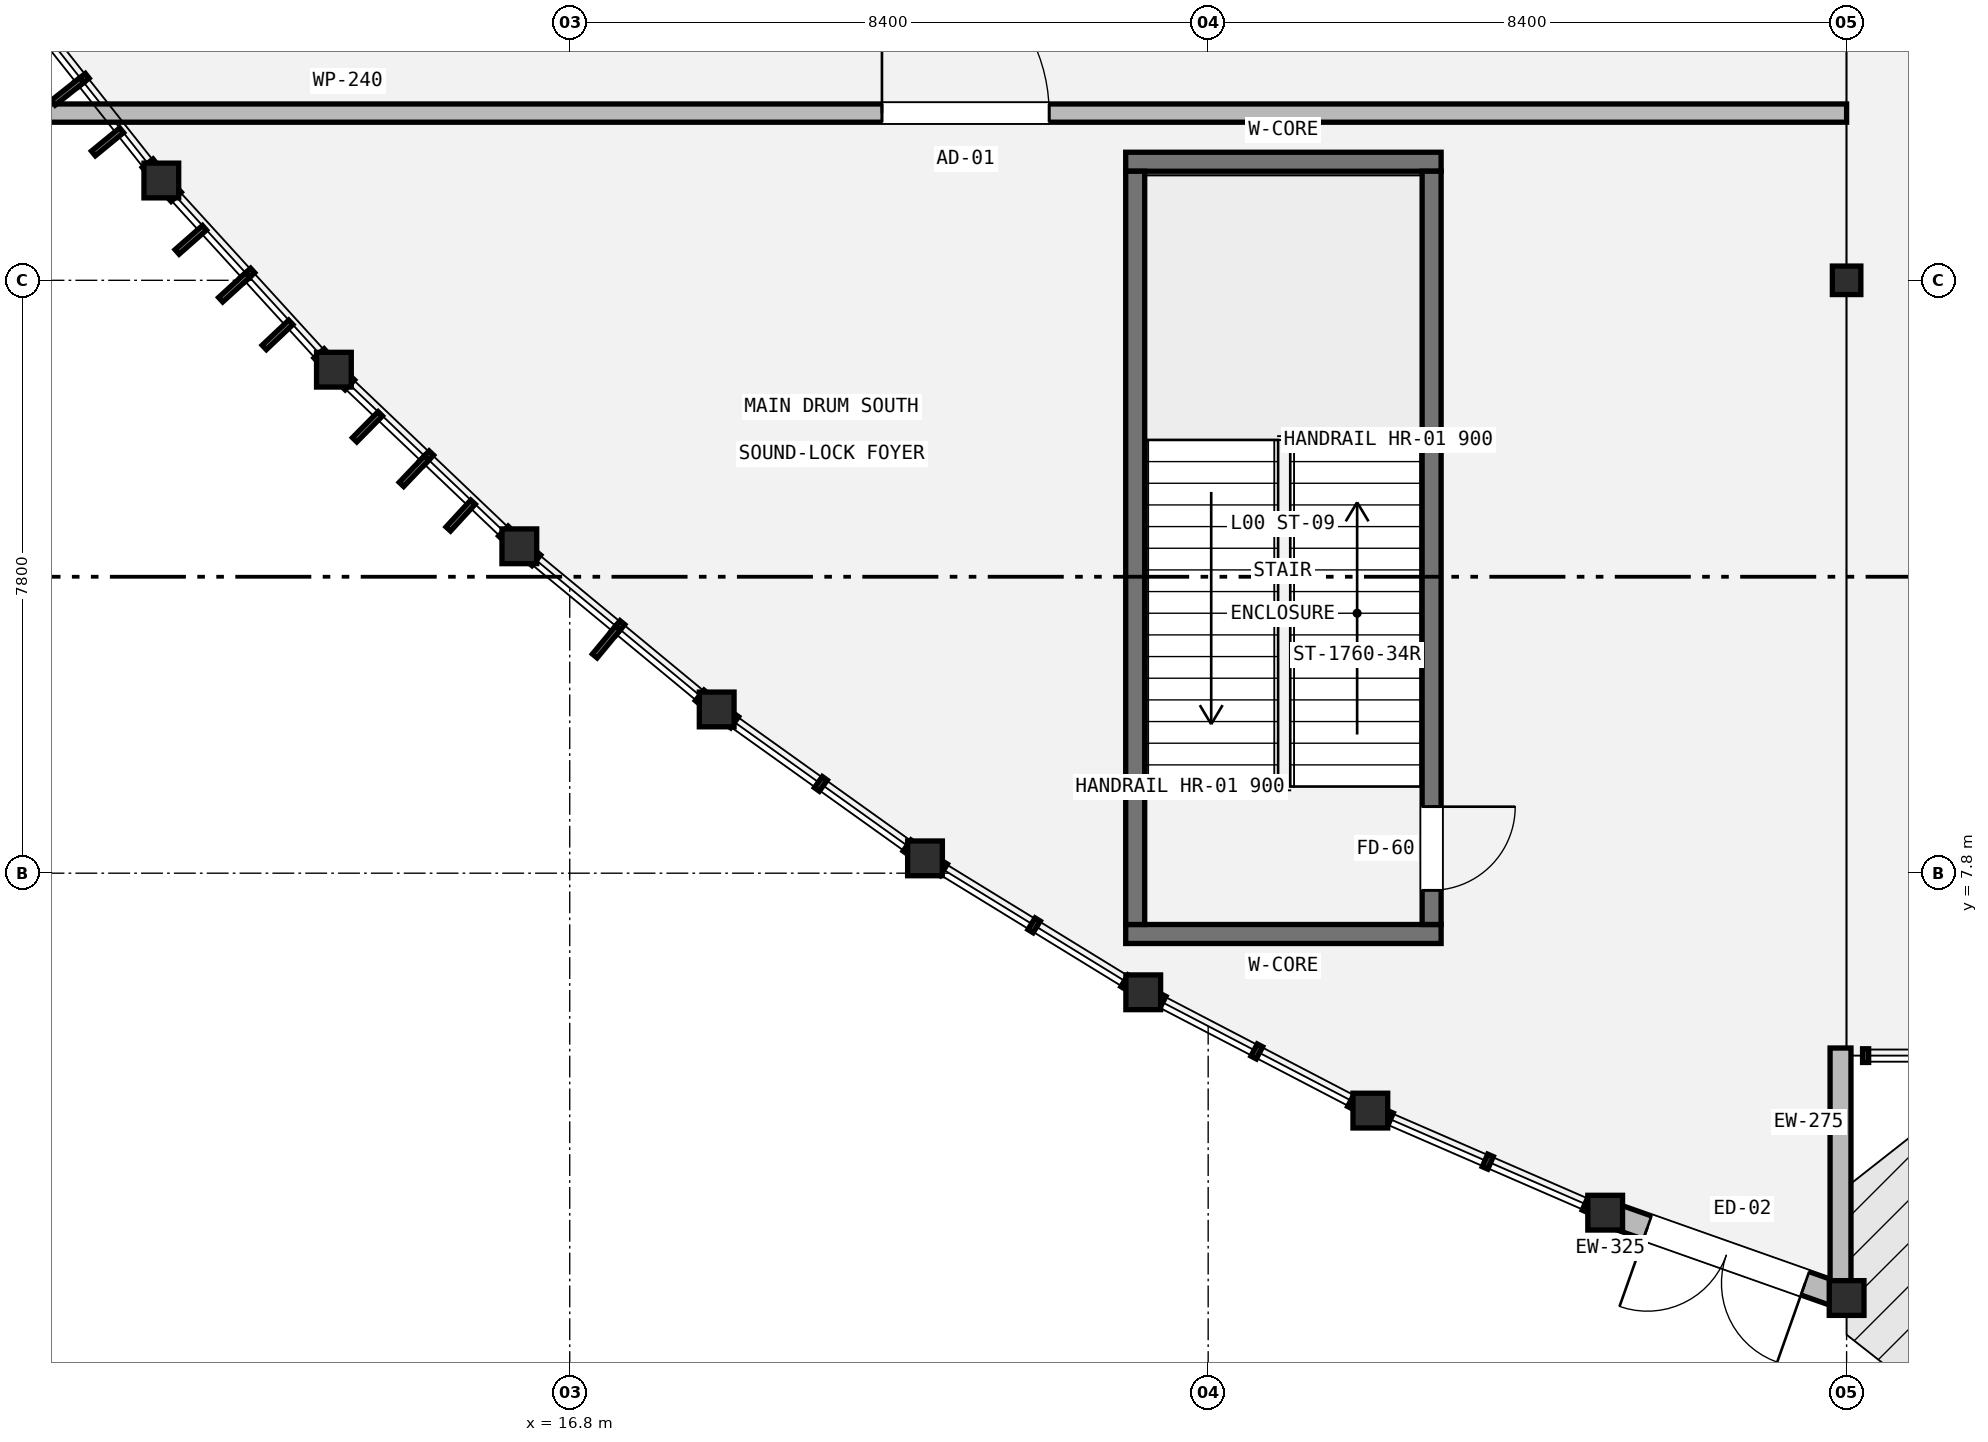
"""IFC4 building model, lengths in metres.
Left out: names, types, materials, properties, quantities, classifications, styles, units other than length and angle.
Written with IfcOpenShell. Run it as: python <this file> out.ifc"""

import sys

from ifc_helpers import new_model, si_unit, direction, frame, frame_2d, origin, origin_2d, place, context, subcontext, project, spatial, rectangle, hollow_circle, i_section, extrude, element, fill, save


model = new_model("IFC4")
c1 = context("Model", 3, precision=1e-05, world=origin(), true_north=direction((0.0, 1.0)))
c2 = subcontext(c1, "Body", "Model", "MODEL_VIEW")
j1 = project(units=[si_unit("LENGTHUNIT", "METRE"), si_unit("PLANEANGLEUNIT", "RADIAN")], contexts=[c1])
p1 = place(None, origin())
s1 = spatial("IfcSite", under=j1, at=p1, CompositionType="ELEMENT")
p2 = place(p1, origin())
s2 = spatial("IfcBuilding", under=s1, at=p2, CompositionType="ELEMENT")
p3 = place(p2, origin())
s3 = spatial("IfcBuildingStorey", under=s2, at=p3, CompositionType="ELEMENT", Elevation=0.0)
p4 = place(p3, frame((33.6, 15.6, 0.0), z_axis=(0.0, 0.0, 1.0), x_axis=(1.0, 0.0, 0.0)))
e1 = element("IfcColumn", 1, at=p4, inside=s3, PredefinedType="COLUMN", context=c2, shape_type="SweptSolid", body=[
    extrude(i_section(OverallWidth=0.375, OverallDepth=0.375, WebThickness=0.017, FlangeThickness=0.027, FilletRadius=0.015, at=origin_2d()), origin(), (0.0, 0.0, 1.0), 5.4),
])
for number, where, z_axis, x_axis in (
    (2, (11.427, 16.913, 0.0), (0.0, 0.0, 1.0), (1.0, 0.0, 0.0)),
    (3, (13.698, 14.424, 0.0), (0.0, 0.0, 1.0), (1.0, 0.0, 0.0)),
    (4, (16.137, 12.101, 0.0), (0.0, 0.0, 1.0), (1.0, 0.0, 0.0)),
    (5, (18.734, 9.954, 0.0), (0.0, 0.0, 1.0), (1.0, 0.0, 0.0)),
    (6, (21.474, 7.995, 0.0), (0.0, 0.0, 1.0), (1.0, 0.0, 0.0)),
    (7, (24.346, 6.233, 0.0), (0.0, 0.0, 1.0), (1.0, 0.0, 0.0)),
    (8, (27.334, 4.677, 0.0), (0.0, 0.0, 1.0), (1.0, 0.0, 0.0)),
    (9, (30.424, 3.334, 0.0), (0.0, 0.0, 1.0), (1.0, 0.0, 0.0)),
    (10, (33.6, 2.211, 0.0), (0.0, 0.0, 1.0), (1.0, 0.0, 0.0)),
):
    element("IfcColumn", number, at=place(p3, frame(where, z_axis=z_axis, x_axis=x_axis)), inside=s3, PredefinedType="COLUMN", context=c2, shape_type="SweptSolid", body=[
        extrude(hollow_circle(Radius=0.229, WallThickness=0.02, at=origin_2d()), origin(), (0.0, 0.0, 1.0), 5.4),
    ])
p5 = place(p3, frame((33.6, 2.211, 0.0), z_axis=(0.0, 0.0, 1.0), x_axis=(-0.942833706296, 0.333263562774, 0.0)))
e11 = element("IfcWall", 11, at=p5, inside=s3, PredefinedType="STANDARD", context=c2, shape_type="SweptSolid", body=[
    extrude(rectangle(XDim=3.369, YDim=0.325, at=frame_2d((1.685, 0.0))), origin(), (0.0, 0.0, 1.0), 4.692),
])
p6 = place(p5, frame((0.58, 0.0, 0.0)))
e12 = element("IfcOpeningElement", 12, at=p6, cuts=e11, PredefinedType="OPENING", context=c2, shape_type="SweptSolid", body=[
    extrude(rectangle(XDim=2.2, YDim=2.5, at=frame_2d((1.1, 1.25))), frame((0.0, 0.172, 0.0), z_axis=(0.0, -1.0, 0.0), x_axis=(1.0, 0.0, 0.0)), (0.0, 0.0, 1.0), 0.345),
])
p7 = place(p3, frame((33.52, 2.05, 0.0), z_axis=(0.0, 0.0, 1.0), x_axis=(0.0, 1.0, 0.0)))
e13 = element("IfcWall", 13, at=p7, inside=s3, PredefinedType="STANDARD", context=c2, shape_type="SweptSolid", body=[
    extrude(rectangle(XDim=3.45, YDim=0.275, at=frame_2d((1.725, 0.0))), origin(), (0.0, 0.0, 1.0), 4.772),
])
for number, where, z_axis, x_axis in (
    (14, (28.265, 7.0, 0.0), (0.0, 0.0, 1.0), (-1.0, 0.0, 0.0)),
    (15, (24.115, 17.16, 0.0), (0.0, 0.0, 1.0), (1.0, 0.0, 0.0)),
):
    element("IfcWall", number, at=place(p3, frame(where, z_axis=z_axis, x_axis=x_axis)), inside=s3, PredefinedType="SHEAR", context=c2, shape_type="SweptSolid", body=[
        extrude(rectangle(XDim=4.15, YDim=0.25, at=frame_2d((2.075, 0.0))), origin(), (0.0, 0.0, 1.0), 5.18),
    ])
p8 = place(p3, frame((24.24, 7.125, 0.0), z_axis=(0.0, 0.0, 1.0), x_axis=(0.0, 1.0, 0.0)))
e16 = element("IfcWall", 16, at=p8, inside=s3, PredefinedType="SHEAR", context=c2, shape_type="SweptSolid", body=[
    extrude(rectangle(XDim=9.91, YDim=0.25, at=frame_2d((4.955, 0.0))), origin(), (0.0, 0.0, 1.0), 5.18),
])
p9 = place(p3, frame((28.14, 17.035, 0.0), z_axis=(0.0, 0.0, 1.0), x_axis=(0.0, -1.0, 0.0)))
e17 = element("IfcWall", 17, at=p9, inside=s3, PredefinedType="SHEAR", context=c2, shape_type="SweptSolid", body=[
    extrude(rectangle(XDim=9.91, YDim=0.25, at=frame_2d((4.955, 0.0))), origin(), (0.0, 0.0, 1.0), 5.18),
])
p10 = place(p9, frame((8.36, 0.0, 0.0)))
e18 = element("IfcOpeningElement", 18, at=p10, cuts=e17, PredefinedType="OPENING", context=c2, shape_type="SweptSolid", body=[
    extrude(rectangle(XDim=1.1, YDim=2.15, at=frame_2d((0.55, 1.075))), frame((0.0, 0.135, 0.0), z_axis=(0.0, -1.0, 0.0), x_axis=(1.0, 0.0, 0.0)), (0.0, 0.0, 1.0), 0.27),
])
p11 = place(p3, frame((7.0, 17.8, 0.0), z_axis=(0.0, 0.0, 1.0), x_axis=(1.0, 0.0, 0.0)))
e19 = element("IfcWall", 19, at=p11, inside=s3, PredefinedType="PARTITIONING", context=c2, shape_type="SweptSolid", body=[
    extrude(rectangle(XDim=26.6, YDim=0.24, at=frame_2d((13.3, 0.0))), origin(), (0.0, 0.0, 1.0), 4.632),
])
p12 = place(p11, frame((13.908, 0.0, 0.0)))
e20 = element("IfcOpeningElement", 20, at=p12, cuts=e19, PredefinedType="OPENING", context=c2, shape_type="SweptSolid", body=[
    extrude(rectangle(XDim=2.2, YDim=2.4, at=frame_2d((1.1, 1.2))), frame((0.0, 0.13, 0.0), z_axis=(0.0, -1.0, 0.0), x_axis=(1.0, 0.0, 0.0)), (0.0, 0.0, 1.0), 0.26),
])
p13 = place(p6, origin())
e21 = element("IfcDoor", 21, at=p13, inside=s3, OperationType="DOUBLE_SWING_RIGHT", PredefinedType="DOOR", context=c2, shape_type="SweptSolid", body=[
    extrude(rectangle(XDim=2.2, YDim=2.5, at=frame_2d((1.1, 1.25))), frame((0.0, 0.025, 0.0), z_axis=(0.0, -1.0, 0.0), x_axis=(1.0, 0.0, 0.0)), (0.0, 0.0, 1.0), 0.05),
])
fill(e12, e21)
p14 = place(p10, origin())
e22 = element("IfcDoor", 22, at=p14, inside=s3, OperationType="SINGLE_SWING_LEFT", PredefinedType="DOOR", context=c2, shape_type="SweptSolid", body=[
    extrude(rectangle(XDim=1.1, YDim=2.15, at=frame_2d((0.55, 1.075))), frame((0.0, 0.025, 0.0), z_axis=(0.0, -1.0, 0.0), x_axis=(1.0, 0.0, 0.0)), (0.0, 0.0, 1.0), 0.05),
])
fill(e18, e22)
p15 = place(p12, origin())
e23 = element("IfcDoor", 23, at=p15, inside=s3, OperationType="SINGLE_SWING_LEFT", PredefinedType="DOOR", context=c2, shape_type="SweptSolid", body=[
    extrude(rectangle(XDim=2.2, YDim=2.4, at=frame_2d((1.1, 1.2))), frame((0.0, 0.025, 0.0), z_axis=(0.0, -1.0, 0.0), x_axis=(1.0, 0.0, 0.0)), (0.0, 0.0, 1.0), 0.05),
])
fill(e20, e23)
save(model, sys.argv[1])
